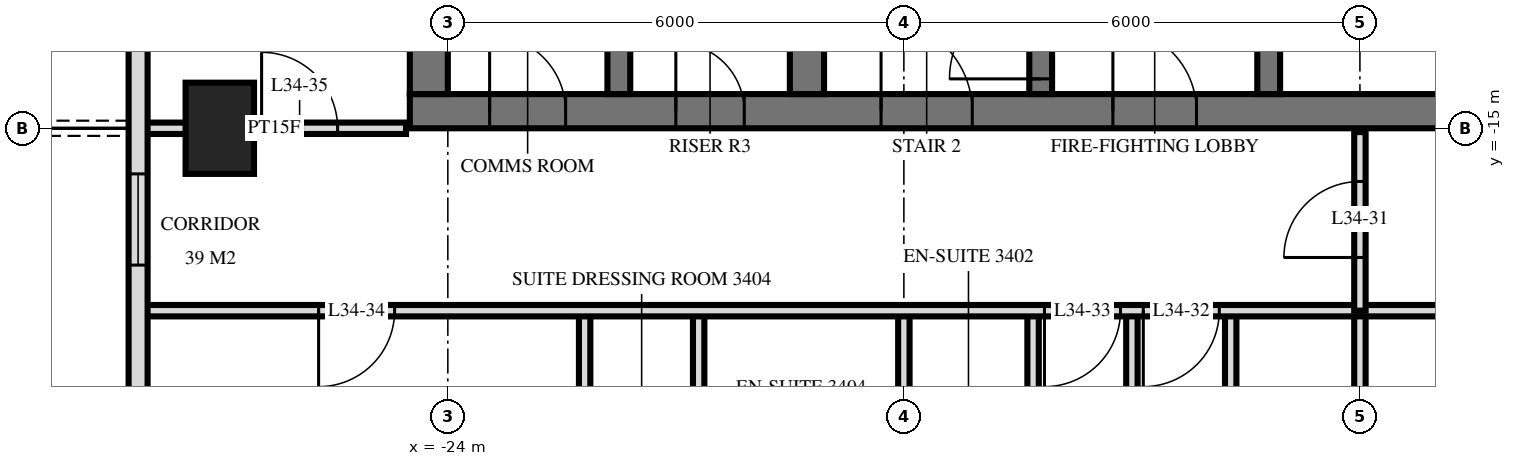
"""IFC4 building model, lengths in metres.
Left out: names, types, materials, properties, quantities, classifications, styles, units other than length and angle.
Written with IfcOpenShell. Run it as: python <this file> out.ifc"""

import sys

from ifc_helpers import new_model, si_unit, direction, frame, frame_2d, origin, origin_2d, place, context, subcontext, project, spatial, rectangle, extrude, element, fill, save


model = new_model("IFC4")
c1 = context("Model", 3, precision=1e-05, world=origin(), true_north=direction((0.0, 1.0)))
c2 = subcontext(c1, "Body", "Model", "MODEL_VIEW")
j1 = project(units=[si_unit("LENGTHUNIT", "METRE"), si_unit("PLANEANGLEUNIT", "RADIAN")], contexts=[c1])
p1 = place(None, origin())
s1 = spatial("IfcSite", under=j1, at=p1, CompositionType="ELEMENT")
p2 = place(p1, origin())
s2 = spatial("IfcBuilding", under=s1, at=p2, CompositionType="ELEMENT")
p3 = place(p2, frame((0.0, 0.0, 134.4)))
s3 = spatial("IfcBuildingStorey", under=s2, at=p3, CompositionType="ELEMENT", Elevation=134.4)
p4 = place(p3, frame((-27.0, -15.0, 0.0), z_axis=(0.0, 0.0, 1.0), x_axis=(0.0, 1.0, 0.0)))
e1 = element("IfcColumn", 1, at=p4, inside=s3, PredefinedType="COLUMN", context=c2, shape_type="SweptSolid", body=[
    extrude(rectangle(XDim=1.2, YDim=0.9, at=origin_2d()), origin(), (0.0, 0.0, 1.0), 3.6),
])
p5 = place(p3, frame((-24.5, -14.775, 0.0), z_axis=(0.0, 0.0, 1.0), x_axis=(1.0, 0.0, 0.0)))
e2 = element("IfcWall", 2, at=p5, inside=s3, PredefinedType="SHEAR", context=c2, shape_type="SweptSolid", body=[
    extrude(rectangle(XDim=14.5, YDim=0.45, at=frame_2d((7.25, 0.0))), origin(), (0.0, 0.0, 1.0), 3.6),
])
p6 = place(p5, frame((6.2, 0.0, 0.0)))
e3 = element("IfcOpeningElement", 3, at=p6, cuts=e2, PredefinedType="OPENING", context=c2, shape_type="SweptSolid", body=[
    extrude(rectangle(XDim=1.2, YDim=2.1, at=frame_2d((0.6, 1.05))), frame((0.0, 0.235, 0.0), z_axis=(0.0, -1.0, 0.0), x_axis=(1.0, 0.0, 0.0)), (0.0, 0.0, 1.0), 0.47),
])
p7 = place(p5, frame((9.25, 0.0, 0.0)))
e4 = element("IfcOpeningElement", 4, at=p7, cuts=e2, PredefinedType="OPENING", context=c2, shape_type="SweptSolid", body=[
    extrude(rectangle(XDim=1.1, YDim=2.1, at=frame_2d((0.55, 1.05))), frame((0.0, 0.235, 0.0), z_axis=(0.0, -1.0, 0.0), x_axis=(1.0, 0.0, 0.0)), (0.0, 0.0, 1.0), 0.47),
])
p8 = place(p5, frame((3.5, 0.0, 0.0)))
e5 = element("IfcOpeningElement", 5, at=p8, cuts=e2, PredefinedType="OPENING", context=c2, shape_type="SweptSolid", body=[
    extrude(rectangle(XDim=0.9, YDim=2.1, at=frame_2d((0.45, 1.05))), frame((0.0, 0.235, 0.0), z_axis=(0.0, -1.0, 0.0), x_axis=(1.0, 0.0, 0.0)), (0.0, 0.0, 1.0), 0.47),
])
p9 = place(p5, frame((1.05, 0.0, 0.0)))
e6 = element("IfcOpeningElement", 6, at=p9, cuts=e2, PredefinedType="OPENING", context=c2, shape_type="SweptSolid", body=[
    extrude(rectangle(XDim=1.0, YDim=2.1, at=frame_2d((0.5, 1.05))), frame((0.0, 0.235, 0.0), z_axis=(0.0, -1.0, 0.0), x_axis=(1.0, 0.0, 0.0)), (0.0, 0.0, 1.0), 0.47),
])
p10 = place(p3, frame((-24.25, -14.55, 0.0), z_axis=(0.0, 0.0, 1.0), x_axis=(0.0, 1.0, 0.0)))
e7 = element("IfcWall", 7, at=p10, inside=s3, PredefinedType="SHEAR", context=c2, shape_type="SweptSolid", body=[
    extrude(rectangle(XDim=14.1, YDim=0.5, at=frame_2d((7.05, 0.0))), origin(), (0.0, 0.0, 1.0), 3.6),
])
p11 = place(p3, frame((-13.2, -14.55, 0.0), z_axis=(0.0, 0.0, 1.0), x_axis=(0.0, 1.0, 0.0)))
e8 = element("IfcWall", 8, at=p11, inside=s3, PredefinedType="SHEAR", context=c2, shape_type="SweptSolid", body=[
    extrude(rectangle(XDim=5.4, YDim=0.3, at=frame_2d((2.7, 0.0))), origin(), (0.0, 0.0, 1.0), 3.6),
])
p12 = place(p11, frame((4.0, 0.0, 0.0)))
e9 = element("IfcOpeningElement", 9, at=p12, cuts=e8, PredefinedType="OPENING", context=c2, shape_type="SweptSolid", body=[
    extrude(rectangle(XDim=1.2, YDim=2.1, at=frame_2d((0.6, 1.05))), frame((0.0, 0.16, 0.0), z_axis=(0.0, -1.0, 0.0), x_axis=(1.0, 0.0, 0.0)), (0.0, 0.0, 1.0), 0.32),
])
p13 = place(p3, frame((-16.2, -14.55, 0.0), z_axis=(0.0, 0.0, 1.0), x_axis=(0.0, 1.0, 0.0)))
e10 = element("IfcWall", 10, at=p13, inside=s3, PredefinedType="SHEAR", context=c2, shape_type="SweptSolid", body=[
    extrude(rectangle(XDim=5.4, YDim=0.3, at=frame_2d((2.7, 0.0))), origin(), (0.0, 0.0, 1.0), 3.6),
])
p14 = place(p13, frame((0.2, 0.0, 0.0)))
e11 = element("IfcOpeningElement", 11, at=p14, cuts=e10, PredefinedType="OPENING", context=c2, shape_type="SweptSolid", body=[
    extrude(rectangle(XDim=1.2, YDim=2.1, at=frame_2d((0.6, 1.05))), frame((0.0, 0.16, 0.0), z_axis=(0.0, -1.0, 0.0), x_axis=(1.0, 0.0, 0.0)), (0.0, 0.0, 1.0), 0.32),
])
p15 = place(p3, frame((-19.275, -14.55, 0.0), z_axis=(0.0, 0.0, 1.0), x_axis=(0.0, 1.0, 0.0)))
e12 = element("IfcWall", 12, at=p15, inside=s3, PredefinedType="SHEAR", context=c2, shape_type="SweptSolid", body=[
    extrude(rectangle(XDim=5.4, YDim=0.45, at=frame_2d((2.7, 0.0))), origin(), (0.0, 0.0, 1.0), 3.6),
])
p16 = place(p3, frame((-21.75, -14.55, 0.0), z_axis=(0.0, 0.0, 1.0), x_axis=(0.0, 1.0, 0.0)))
e13 = element("IfcWall", 13, at=p16, inside=s3, PredefinedType="SHEAR", context=c2, shape_type="SweptSolid", body=[
    extrude(rectangle(XDim=5.4, YDim=0.3, at=frame_2d((2.7, 0.0))), origin(), (0.0, 0.0, 1.0), 3.6),
])
p17 = place(p3, frame((-28.075, -3.325, 0.0), z_axis=(0.0, 0.0, 1.0), x_axis=(0.0, -1.0, 0.0)))
e14 = element("IfcWall", 14, at=p17, inside=s3, PredefinedType="SOLIDWALL", context=c2, shape_type="SweptSolid", body=[
    extrude(rectangle(XDim=25.951, YDim=0.25, at=frame_2d((12.975, 0.0))), origin(), (0.0, 0.0, 1.0), 3.32),
])
p18 = place(p17, frame((6.65, 0.0, 0.0)))
e15 = element("IfcOpeningElement", 15, at=p18, cuts=e14, PredefinedType="OPENING", context=c2, shape_type="SweptSolid", body=[
    extrude(rectangle(XDim=1.8, YDim=2.4, at=frame_2d((0.9, 1.2))), frame((0.0, 0.135, 0.0), z_axis=(0.0, -1.0, 0.0), x_axis=(1.0, 0.0, 0.0)), (0.0, 0.0, 1.0), 0.27),
])
p19 = place(p17, frame((12.275, 0.0, 0.3)))
e16 = element("IfcOpeningElement", 16, at=p19, cuts=e14, PredefinedType="OPENING", context=c2, shape_type="SweptSolid", body=[
    extrude(rectangle(XDim=1.2, YDim=2.1, at=frame_2d((0.6, 1.05))), frame((0.0, 0.135, 0.0), z_axis=(0.0, -1.0, 0.0), x_axis=(1.0, 0.0, 0.0)), (0.0, 0.0, 1.0), 0.27),
])
p20 = place(p17, frame((15.575, 0.0, 0.3)))
e17 = element("IfcOpeningElement", 17, at=p20, cuts=e14, PredefinedType="OPENING", context=c2, shape_type="SweptSolid", body=[
    extrude(rectangle(XDim=1.2, YDim=2.1, at=frame_2d((0.6, 1.05))), frame((0.0, 0.135, 0.0), z_axis=(0.0, -1.0, 0.0), x_axis=(1.0, 0.0, 0.0)), (0.0, 0.0, 1.0), 0.27),
])
p21 = place(p17, frame((18.175, 0.0, 0.0)))
e18 = element("IfcOpeningElement", 18, at=p21, cuts=e14, PredefinedType="OPENING", context=c2, shape_type="SweptSolid", body=[
    extrude(rectangle(XDim=1.8, YDim=2.4, at=frame_2d((0.9, 1.2))), frame((0.0, 0.135, 0.0), z_axis=(0.0, -1.0, 0.0), x_axis=(1.0, 0.0, 0.0)), (0.0, 0.0, 1.0), 0.27),
])
p22 = place(p17, frame((21.075, 0.0, 0.0)))
e19 = element("IfcOpeningElement", 19, at=p22, cuts=e14, PredefinedType="OPENING", context=c2, shape_type="SweptSolid", body=[
    extrude(rectangle(XDim=1.8, YDim=2.4, at=frame_2d((0.9, 1.2))), frame((0.0, 0.135, 0.0), z_axis=(0.0, -1.0, 0.0), x_axis=(1.0, 0.0, 0.0)), (0.0, 0.0, 1.0), 0.27),
])
p23 = place(p17, frame((23.825, 0.0, 0.3)))
e20 = element("IfcOpeningElement", 20, at=p23, cuts=e14, PredefinedType="OPENING", context=c2, shape_type="SweptSolid", body=[
    extrude(rectangle(XDim=1.8, YDim=2.1, at=frame_2d((0.9, 1.05))), frame((0.0, 0.135, 0.0), z_axis=(0.0, -1.0, 0.0), x_axis=(1.0, 0.0, 0.0)), (0.0, 0.0, 1.0), 0.27),
])
p24 = place(p3, frame((-12.0, -17.4, 0.0), z_axis=(0.0, 0.0, 1.0), x_axis=(0.0, 1.0, 0.0)))
e21 = element("IfcWall", 21, at=p24, inside=s3, PredefinedType="PARTITIONING", context=c2, shape_type="SweptSolid", body=[
    extrude(rectangle(XDim=2.35, YDim=0.15, at=frame_2d((1.175, 0.0))), origin(), (0.0, 0.0, 1.0), 3.32),
])
p25 = place(p24, frame((0.7, 0.0, 0.0)))
e22 = element("IfcOpeningElement", 22, at=p25, cuts=e21, PredefinedType="OPENING", context=c2, shape_type="SweptSolid", body=[
    extrude(rectangle(XDim=1.0, YDim=2.1, at=frame_2d((0.5, 1.05))), frame((0.0, 0.085, 0.0), z_axis=(0.0, -1.0, 0.0), x_axis=(1.0, 0.0, 0.0)), (0.0, 0.0, 1.0), 0.17),
])
p26 = place(p3, frame((-12.0, -33.62, 0.0), z_axis=(0.0, 0.0, 1.0), x_axis=(0.0, 1.0, 0.0)))
e23 = element("IfcWall", 23, at=p26, inside=s3, PredefinedType="PARTITIONING", context=c2, shape_type="SweptSolid", body=[
    extrude(rectangle(XDim=16.22, YDim=0.15, at=frame_2d((8.11, 0.0))), origin(), (0.0, 0.0, 1.0), 3.32),
])
p27 = place(p3, frame((-13.7, -21.2, 0.0), z_axis=(0.0, 0.0, 1.0), x_axis=(0.0, 1.0, 0.0)))
e24 = element("IfcWall", 24, at=p27, inside=s3, PredefinedType="PARTITIONING", context=c2, shape_type="SweptSolid", body=[
    extrude(rectangle(XDim=3.8, YDim=0.15, at=frame_2d((1.9, 0.0))), origin(), (0.0, 0.0, 1.0), 3.32),
])
p28 = place(p27, frame((1.5, 0.0, 0.0)))
e25 = element("IfcOpeningElement", 25, at=p28, cuts=e24, PredefinedType="OPENING", context=c2, shape_type="SweptSolid", body=[
    extrude(rectangle(XDim=0.8, YDim=2.1, at=frame_2d((0.4, 1.05))), frame((0.0, 0.085, 0.0), z_axis=(0.0, -1.0, 0.0), x_axis=(1.0, 0.0, 0.0)), (0.0, 0.0, 1.0), 0.17),
])
p29 = place(p3, frame((-15.0, -33.62, 0.0), z_axis=(0.0, 0.0, 1.0), x_axis=(0.0, 1.0, 0.0)))
e26 = element("IfcWall", 26, at=p29, inside=s3, PredefinedType="PARTITIONING", context=c2, shape_type="SweptSolid", body=[
    extrude(rectangle(XDim=16.22, YDim=0.15, at=frame_2d((8.11, 0.0))), origin(), (0.0, 0.0, 1.0), 3.32),
])
p30 = place(p3, frame((-16.3, -21.2, 0.0), z_axis=(0.0, 0.0, 1.0), x_axis=(0.0, 1.0, 0.0)))
e27 = element("IfcWall", 27, at=p30, inside=s3, PredefinedType="PARTITIONING", context=c2, shape_type="SweptSolid", body=[
    extrude(rectangle(XDim=3.8, YDim=0.15, at=frame_2d((1.9, 0.0))), origin(), (0.0, 0.0, 1.0), 3.32),
])
p31 = place(p30, frame((1.5, 0.0, 0.0)))
e28 = element("IfcOpeningElement", 28, at=p31, cuts=e27, PredefinedType="OPENING", context=c2, shape_type="SweptSolid", body=[
    extrude(rectangle(XDim=0.8, YDim=2.1, at=frame_2d((0.4, 1.05))), frame((0.0, 0.085, 0.0), z_axis=(0.0, -1.0, 0.0), x_axis=(1.0, 0.0, 0.0)), (0.0, 0.0, 1.0), 0.17),
])
p32 = place(p3, frame((-18.0, -33.62, 0.0), z_axis=(0.0, 0.0, 1.0), x_axis=(0.0, 1.0, 0.0)))
e29 = element("IfcWall", 29, at=p32, inside=s3, PredefinedType="PARTITIONING", context=c2, shape_type="SweptSolid", body=[
    extrude(rectangle(XDim=16.22, YDim=0.15, at=frame_2d((8.11, 0.0))), origin(), (0.0, 0.0, 1.0), 3.32),
])
p33 = place(p3, frame((-20.7, -20.4, 0.0), z_axis=(0.0, 0.0, 1.0), x_axis=(0.0, 1.0, 0.0)))
e30 = element("IfcWall", 30, at=p33, inside=s3, PredefinedType="PARTITIONING", context=c2, shape_type="SweptSolid", body=[
    extrude(rectangle(XDim=3.0, YDim=0.15, at=frame_2d((1.5, 0.0))), origin(), (0.0, 0.0, 1.0), 3.32),
])
p34 = place(p3, frame((-22.2, -20.4, 0.0), z_axis=(0.0, 0.0, 1.0), x_axis=(0.0, 1.0, 0.0)))
e31 = element("IfcWall", 31, at=p34, inside=s3, PredefinedType="PARTITIONING", context=c2, shape_type="SweptSolid", body=[
    extrude(rectangle(XDim=3.0, YDim=0.15, at=frame_2d((1.5, 0.0))), origin(), (0.0, 0.0, 1.0), 3.32),
])
p35 = place(p34, frame((1.05, 0.0, 0.0)))
e32 = element("IfcOpeningElement", 32, at=p35, cuts=e31, PredefinedType="OPENING", context=c2, shape_type="SweptSolid", body=[
    extrude(rectangle(XDim=0.9, YDim=2.1, at=frame_2d((0.45, 1.05))), frame((0.0, 0.085, 0.0), z_axis=(0.0, -1.0, 0.0), x_axis=(1.0, 0.0, 0.0)), (0.0, 0.0, 1.0), 0.17),
])
p36 = place(p3, frame((-28.02, -17.4, 0.0), z_axis=(0.0, 0.0, 1.0), x_axis=(1.0, 0.0, 0.0)))
e33 = element("IfcWall", 33, at=p36, inside=s3, PredefinedType="PARTITIONING", context=c2, shape_type="SweptSolid", body=[
    extrude(rectangle(XDim=56.04, YDim=0.15, at=frame_2d((28.02, 0.0))), origin(), (0.0, 0.0, 1.0), 3.32),
])
p37 = place(p36, frame((13.17, 0.0, 0.0)))
e34 = element("IfcOpeningElement", 34, at=p37, cuts=e33, PredefinedType="OPENING", context=c2, shape_type="SweptSolid", body=[
    extrude(rectangle(XDim=1.0, YDim=2.1, at=frame_2d((0.5, 1.05))), frame((0.0, 0.085, 0.0), z_axis=(0.0, -1.0, 0.0), x_axis=(1.0, 0.0, 0.0)), (0.0, 0.0, 1.0), 0.17),
])
p38 = place(p36, frame((11.87, 0.0, 0.0)))
e35 = element("IfcOpeningElement", 35, at=p38, cuts=e33, PredefinedType="OPENING", context=c2, shape_type="SweptSolid", body=[
    extrude(rectangle(XDim=1.0, YDim=2.1, at=frame_2d((0.5, 1.05))), frame((0.0, 0.085, 0.0), z_axis=(0.0, -1.0, 0.0), x_axis=(1.0, 0.0, 0.0)), (0.0, 0.0, 1.0), 0.17),
])
p39 = place(p36, frame((2.32, 0.0, 0.0)))
e36 = element("IfcOpeningElement", 36, at=p39, cuts=e33, PredefinedType="OPENING", context=c2, shape_type="SweptSolid", body=[
    extrude(rectangle(XDim=1.0, YDim=2.1, at=frame_2d((0.5, 1.05))), frame((0.0, 0.085, 0.0), z_axis=(0.0, -1.0, 0.0), x_axis=(1.0, 0.0, 0.0)), (0.0, 0.0, 1.0), 0.17),
])
p40 = place(p36, frame((40.17, 0.0, 0.0)))
e37 = element("IfcOpeningElement", 37, at=p40, cuts=e33, PredefinedType="OPENING", context=c2, shape_type="SweptSolid", body=[
    extrude(rectangle(XDim=1.0, YDim=2.1, at=frame_2d((0.5, 1.05))), frame((0.0, 0.085, 0.0), z_axis=(0.0, -1.0, 0.0), x_axis=(1.0, 0.0, 0.0)), (0.0, 0.0, 1.0), 0.17),
])
p41 = place(p36, frame((51.22, 0.0, 0.0)))
e38 = element("IfcOpeningElement", 38, at=p41, cuts=e33, PredefinedType="OPENING", context=c2, shape_type="SweptSolid", body=[
    extrude(rectangle(XDim=1.0, YDim=2.1, at=frame_2d((0.5, 1.05))), frame((0.0, 0.085, 0.0), z_axis=(0.0, -1.0, 0.0), x_axis=(1.0, 0.0, 0.0)), (0.0, 0.0, 1.0), 0.17),
])
p42 = place(p36, frame((18.52, 0.0, 0.0)))
e39 = element("IfcOpeningElement", 39, at=p42, cuts=e33, PredefinedType="OPENING", context=c2, shape_type="SweptSolid", body=[
    extrude(rectangle(XDim=1.0, YDim=2.1, at=frame_2d((0.5, 1.05))), frame((0.0, 0.085, 0.0), z_axis=(0.0, -1.0, 0.0), x_axis=(1.0, 0.0, 0.0)), (0.0, 0.0, 1.0), 0.17),
])
p43 = place(p36, frame((26.02, 0.0, 0.0)))
e40 = element("IfcOpeningElement", 40, at=p43, cuts=e33, PredefinedType="OPENING", context=c2, shape_type="SweptSolid", body=[
    extrude(rectangle(XDim=1.0, YDim=2.1, at=frame_2d((0.5, 1.05))), frame((0.0, 0.085, 0.0), z_axis=(0.0, -1.0, 0.0), x_axis=(1.0, 0.0, 0.0)), (0.0, 0.0, 1.0), 0.17),
])
p44 = place(p36, frame((35.02, 0.0, 0.0)))
e41 = element("IfcOpeningElement", 41, at=p44, cuts=e33, PredefinedType="OPENING", context=c2, shape_type="SweptSolid", body=[
    extrude(rectangle(XDim=1.0, YDim=2.1, at=frame_2d((0.5, 1.05))), frame((0.0, 0.085, 0.0), z_axis=(0.0, -1.0, 0.0), x_axis=(1.0, 0.0, 0.0)), (0.0, 0.0, 1.0), 0.17),
])
p45 = place(p3, frame((-28.02, -15.0, 0.0), z_axis=(0.0, 0.0, 1.0), x_axis=(1.0, 0.0, 0.0)))
e42 = element("IfcWall", 42, at=p45, inside=s3, PredefinedType="PARTITIONING", context=c2, shape_type="SweptSolid", body=[
    extrude(rectangle(XDim=3.47, YDim=0.15, at=frame_2d((1.735, 0.0))), origin(), (0.0, 0.0, 1.0), 3.32),
])
p46 = place(p45, frame((1.57, 0.0, 0.0)))
e43 = element("IfcOpeningElement", 43, at=p46, cuts=e42, PredefinedType="OPENING", context=c2, shape_type="SweptSolid", body=[
    extrude(rectangle(XDim=1.0, YDim=2.1, at=frame_2d((0.5, 1.05))), frame((0.0, 0.085, 0.0), z_axis=(0.0, -1.0, 0.0), x_axis=(1.0, 0.0, 0.0)), (0.0, 0.0, 1.0), 0.17),
])
p47 = place(p19, origin())
e44 = element("IfcWindow", 44, at=p47, inside=s3, PartitioningType="SINGLE_PANEL", PredefinedType="WINDOW", context=c2, shape_type="SweptSolid", body=[
    extrude(rectangle(XDim=1.2, YDim=2.1, at=frame_2d((0.6, 1.05))), frame((0.0, 0.03, 0.0), z_axis=(0.0, -1.0, 0.0), x_axis=(1.0, 0.0, 0.0)), (0.0, 0.0, 1.0), 0.06),
])
fill(e16, e44)
p48 = place(p6, origin())
e45 = element("IfcDoor", 45, at=p48, inside=s3, OperationType="SINGLE_SWING_RIGHT", PredefinedType="DOOR", context=c2, shape_type="SweptSolid", body=[
    extrude(rectangle(XDim=1.2, YDim=2.1, at=frame_2d((0.6, 1.05))), frame((0.0, 0.025, 0.0), z_axis=(0.0, -1.0, 0.0), x_axis=(1.0, 0.0, 0.0)), (0.0, 0.0, 1.0), 0.05),
])
fill(e3, e45)
p49 = place(p7, origin())
e46 = element("IfcDoor", 46, at=p49, inside=s3, OperationType="SINGLE_SWING_RIGHT", PredefinedType="DOOR", context=c2, shape_type="SweptSolid", body=[
    extrude(rectangle(XDim=1.1, YDim=2.1, at=frame_2d((0.55, 1.05))), frame((0.0, 0.025, 0.0), z_axis=(0.0, -1.0, 0.0), x_axis=(1.0, 0.0, 0.0)), (0.0, 0.0, 1.0), 0.05),
])
fill(e4, e46)
p50 = place(p8, origin())
e47 = element("IfcDoor", 47, at=p50, inside=s3, OperationType="SINGLE_SWING_RIGHT", PredefinedType="DOOR", context=c2, shape_type="SweptSolid", body=[
    extrude(rectangle(XDim=0.9, YDim=2.1, at=frame_2d((0.45, 1.05))), frame((0.0, 0.025, 0.0), z_axis=(0.0, -1.0, 0.0), x_axis=(1.0, 0.0, 0.0)), (0.0, 0.0, 1.0), 0.05),
])
fill(e5, e47)
p51 = place(p9, origin())
e48 = element("IfcDoor", 48, at=p51, inside=s3, OperationType="SINGLE_SWING_RIGHT", PredefinedType="DOOR", context=c2, shape_type="SweptSolid", body=[
    extrude(rectangle(XDim=1.0, YDim=2.1, at=frame_2d((0.5, 1.05))), frame((0.0, 0.025, 0.0), z_axis=(0.0, -1.0, 0.0), x_axis=(1.0, 0.0, 0.0)), (0.0, 0.0, 1.0), 0.05),
])
fill(e6, e48)
p52 = place(p14, origin())
e49 = element("IfcDoor", 49, at=p52, inside=s3, OperationType="SINGLE_SWING_RIGHT", PredefinedType="DOOR", context=c2, shape_type="SweptSolid", body=[
    extrude(rectangle(XDim=1.2, YDim=2.1, at=frame_2d((0.6, 1.05))), frame((0.0, 0.025, 0.0), z_axis=(0.0, -1.0, 0.0), x_axis=(1.0, 0.0, 0.0)), (0.0, 0.0, 1.0), 0.05),
])
fill(e11, e49)
p53 = place(p25, origin())
e50 = element("IfcDoor", 50, at=p53, inside=s3, OperationType="SINGLE_SWING_RIGHT", PredefinedType="DOOR", context=c2, shape_type="SweptSolid", body=[
    extrude(rectangle(XDim=1.0, YDim=2.1, at=frame_2d((0.5, 1.05))), frame((0.0, 0.025, 0.0), z_axis=(0.0, -1.0, 0.0), x_axis=(1.0, 0.0, 0.0)), (0.0, 0.0, 1.0), 0.05),
])
fill(e22, e50)
p54 = place(p37, frame((0.5, 0.0, 0.0), z_axis=(0.0, 0.0, 1.0), x_axis=(-1.0, 0.0, 0.0)))
e51 = element("IfcDoor", 51, at=p54, inside=s3, OperationType="SINGLE_SWING_LEFT", PredefinedType="DOOR", context=c2, shape_type="SweptSolid", body=[
    extrude(rectangle(XDim=1.0, YDim=2.1, at=frame_2d((0.0, 1.05))), frame((0.0, -0.025, 0.0), z_axis=(0.0, 1.0, 0.0), x_axis=(-1.0, 0.0, 0.0)), (0.0, 0.0, 1.0), 0.05),
])
fill(e34, e51)
p55 = place(p38, frame((0.5, 0.0, 0.0), z_axis=(0.0, 0.0, 1.0), x_axis=(-1.0, 0.0, 0.0)))
e52 = element("IfcDoor", 52, at=p55, inside=s3, OperationType="SINGLE_SWING_LEFT", PredefinedType="DOOR", context=c2, shape_type="SweptSolid", body=[
    extrude(rectangle(XDim=1.0, YDim=2.1, at=frame_2d((0.0, 1.05))), frame((0.0, -0.025, 0.0), z_axis=(0.0, 1.0, 0.0), x_axis=(-1.0, 0.0, 0.0)), (0.0, 0.0, 1.0), 0.05),
])
fill(e35, e52)
p56 = place(p39, frame((0.5, 0.0, 0.0), z_axis=(0.0, 0.0, 1.0), x_axis=(-1.0, 0.0, 0.0)))
e53 = element("IfcDoor", 53, at=p56, inside=s3, OperationType="SINGLE_SWING_LEFT", PredefinedType="DOOR", context=c2, shape_type="SweptSolid", body=[
    extrude(rectangle(XDim=1.0, YDim=2.1, at=frame_2d((0.0, 1.05))), frame((0.0, -0.025, 0.0), z_axis=(0.0, 1.0, 0.0), x_axis=(-1.0, 0.0, 0.0)), (0.0, 0.0, 1.0), 0.05),
])
fill(e36, e53)
p57 = place(p46, origin())
e54 = element("IfcDoor", 54, at=p57, inside=s3, OperationType="SINGLE_SWING_RIGHT", PredefinedType="DOOR", context=c2, shape_type="SweptSolid", body=[
    extrude(rectangle(XDim=1.0, YDim=2.1, at=frame_2d((0.5, 1.05))), frame((0.0, 0.025, 0.0), z_axis=(0.0, -1.0, 0.0), x_axis=(1.0, 0.0, 0.0)), (0.0, 0.0, 1.0), 0.05),
])
fill(e43, e54)
save(model, sys.argv[1])
